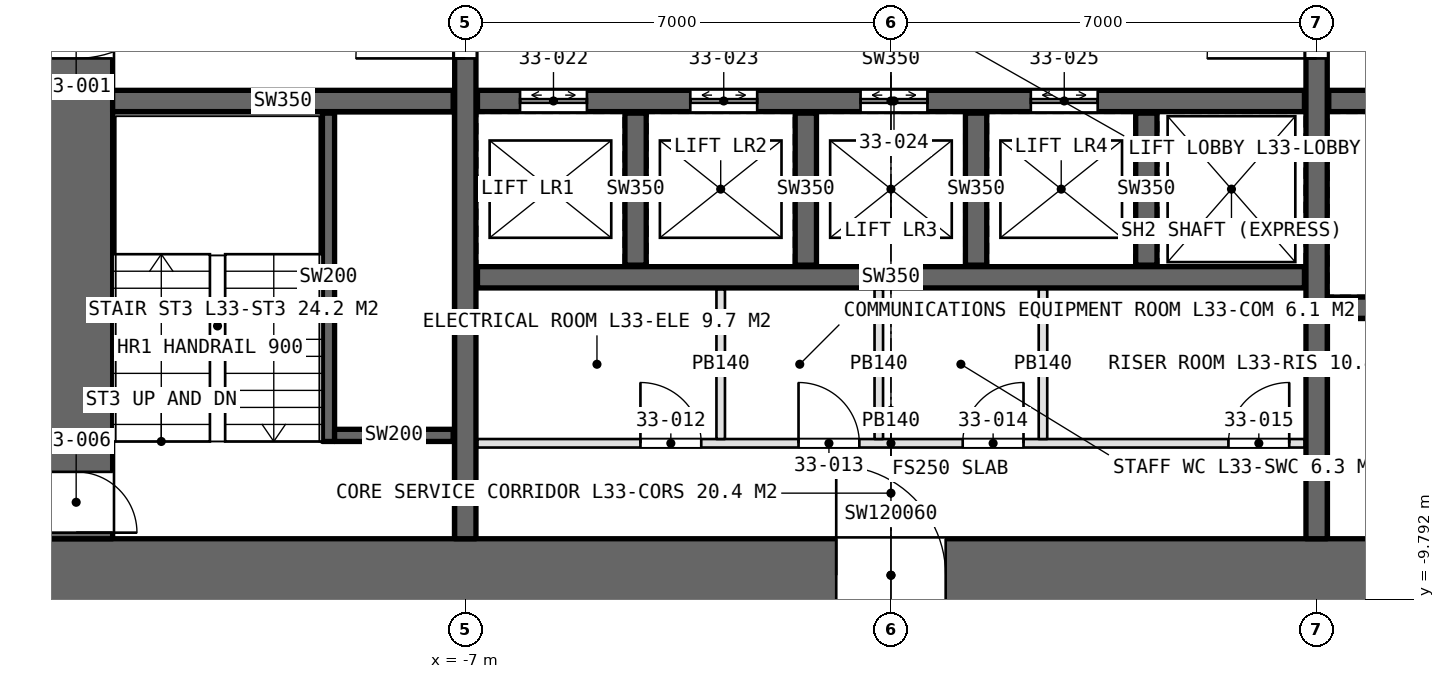
"""IFC4 building model, lengths in metres.
Left out: names, types, materials, properties, quantities, classifications, styles, units other than length and angle.
Written with IfcOpenShell. Run it as: python <this file> out.ifc"""

import sys

from ifc_helpers import new_model, si_unit, direction, frame, frame_2d, origin, place, context, subcontext, project, spatial, rectangle, extrude, element, fill, save


model = new_model("IFC4")
c1 = context("Model", 3, precision=1e-05, world=origin(), true_north=direction((0.0, 1.0)))
c2 = subcontext(c1, "Body", "Model", "MODEL_VIEW")
j1 = project(units=[si_unit("LENGTHUNIT", "METRE"), si_unit("PLANEANGLEUNIT", "RADIAN")], contexts=[c1])
p1 = place(None, origin())
s1 = spatial("IfcSite", under=j1, at=p1, CompositionType="ELEMENT")
p2 = place(p1, origin())
s2 = spatial("IfcBuilding", under=s1, at=p2, CompositionType="ELEMENT")
p3 = place(p2, frame((0.0, 0.0, 155.4)))
s3 = spatial("IfcBuildingStorey", under=s2, at=p3, CompositionType="ELEMENT", Elevation=155.4)
p4 = place(p3, frame((-14.0, -9.4, 0.0), z_axis=(0.0, 0.0, 1.0), x_axis=(1.0, 0.0, 0.0)))
e1 = element("IfcWall", 1, at=p4, inside=s3, PredefinedType="SHEAR", context=c2, shape_type="SweptSolid", body=[
    extrude(rectangle(XDim=28.0, YDim=1.2, at=frame_2d((14.0, 0.0))), origin(), (0.0, 0.0, 1.0), 4.2),
])
p5 = place(p4, frame((13.1, 0.0, 0.0)))
e2 = element("IfcOpeningElement", 2, at=p5, cuts=e1, PredefinedType="OPENING", context=c2, shape_type="SweptSolid", body=[
    extrude(rectangle(XDim=1.8, YDim=2.4, at=frame_2d((0.9, 1.2))), frame((0.0, 0.61, 0.0), z_axis=(0.0, -1.0, 0.0), x_axis=(1.0, 0.0, 0.0)), (0.0, 0.0, 1.0), 1.22),
])
p6 = place(p4, frame((22.9, 0.0, 0.0)))
e3 = element("IfcOpeningElement", 3, at=p6, cuts=e1, PredefinedType="OPENING", context=c2, shape_type="SweptSolid", body=[
    extrude(rectangle(XDim=2.2, YDim=2.7, at=frame_2d((1.1, 1.35))), frame((0.0, 0.61, 0.0), z_axis=(0.0, -1.0, 0.0), x_axis=(1.0, 0.0, 0.0)), (0.0, 0.0, 1.0), 1.22),
])
p7 = place(p3, frame((-13.4, 8.8, 0.0), z_axis=(0.0, 0.0, 1.0), x_axis=(0.0, -1.0, 0.0)))
e4 = element("IfcWall", 4, at=p7, inside=s3, PredefinedType="SHEAR", context=c2, shape_type="SweptSolid", body=[
    extrude(rectangle(XDim=17.6, YDim=1.2, at=frame_2d((8.8, 0.0))), origin(), (0.0, 0.0, 1.0), 4.2),
])
p8 = place(p7, frame((7.9, 0.0, 0.0)))
e5 = element("IfcOpeningElement", 5, at=p8, cuts=e4, PredefinedType="OPENING", context=c2, shape_type="SweptSolid", body=[
    extrude(rectangle(XDim=1.8, YDim=2.4, at=frame_2d((0.9, 1.2))), frame((0.0, 0.61, 0.0), z_axis=(0.0, -1.0, 0.0), x_axis=(1.0, 0.0, 0.0)), (0.0, 0.0, 1.0), 1.22),
])
p9 = place(p7, frame((16.5, 0.0, 0.0)))
e6 = element("IfcOpeningElement", 6, at=p9, cuts=e4, PredefinedType="OPENING", context=c2, shape_type="SweptSolid", body=[
    extrude(rectangle(XDim=1.0, YDim=2.4, at=frame_2d((0.5, 1.2))), frame((0.0, 0.61, 0.0), z_axis=(0.0, -1.0, 0.0), x_axis=(1.0, 0.0, 0.0)), (0.0, 0.0, 1.0), 1.22),
])
p10 = place(p3, frame((-7.0, -8.8, 0.0), z_axis=(0.0, 0.0, 1.0), x_axis=(0.0, 1.0, 0.0)))
e7 = element("IfcWall", 7, at=p10, inside=s3, PredefinedType="SHEAR", context=c2, shape_type="SweptSolid", body=[
    extrude(rectangle(XDim=17.6, YDim=0.35, at=frame_2d((8.8, 0.0))), origin(), (0.0, 0.0, 1.0), 4.2),
])
p11 = place(p10, frame((7.9, 0.0, 0.0)))
e8 = element("IfcOpeningElement", 8, at=p11, cuts=e7, PredefinedType="OPENING", context=c2, shape_type="SweptSolid", body=[
    extrude(rectangle(XDim=1.8, YDim=2.4, at=frame_2d((0.9, 1.2))), frame((0.0, 0.185, 0.0), z_axis=(0.0, -1.0, 0.0), x_axis=(1.0, 0.0, 0.0)), (0.0, 0.0, 1.0), 0.37),
])
p12 = place(p3, frame((7.0, -8.8, 0.0), z_axis=(0.0, 0.0, 1.0), x_axis=(0.0, 1.0, 0.0)))
e9 = element("IfcWall", 9, at=p12, inside=s3, PredefinedType="SHEAR", context=c2, shape_type="SweptSolid", body=[
    extrude(rectangle(XDim=17.6, YDim=0.35, at=frame_2d((8.8, 0.0))), origin(), (0.0, 0.0, 1.0), 4.2),
])
p13 = place(p12, frame((7.9, 0.0, 0.0)))
e10 = element("IfcOpeningElement", 10, at=p13, cuts=e9, PredefinedType="OPENING", context=c2, shape_type="SweptSolid", body=[
    extrude(rectangle(XDim=1.8, YDim=2.4, at=frame_2d((0.9, 1.2))), frame((0.0, 0.185, 0.0), z_axis=(0.0, -1.0, 0.0), x_axis=(1.0, 0.0, 0.0)), (0.0, 0.0, 1.0), 0.37),
])
p14 = place(p3, frame((-6.8, -1.6, 0.0), z_axis=(0.0, 0.0, 1.0), x_axis=(1.0, 0.0, 0.0)))
e11 = element("IfcWall", 11, at=p14, inside=s3, PredefinedType="SHEAR", context=c2, shape_type="SweptSolid", body=[
    extrude(rectangle(XDim=13.6, YDim=0.35, at=frame_2d((6.8, 0.0))), origin(), (0.0, 0.0, 1.0), 4.2),
])
p15 = place(p14, frame((0.7, 0.0, 0.0)))
e12 = element("IfcOpeningElement", 12, at=p15, cuts=e11, PredefinedType="OPENING", context=c2, shape_type="SweptSolid", body=[
    extrude(rectangle(XDim=1.1, YDim=2.4, at=frame_2d((0.55, 1.2))), frame((0.0, 0.185, 0.0), z_axis=(0.0, -1.0, 0.0), x_axis=(1.0, 0.0, 0.0)), (0.0, 0.0, 1.0), 0.37),
])
p16 = place(p14, frame((3.5, 0.0, 0.0)))
e13 = element("IfcOpeningElement", 13, at=p16, cuts=e11, PredefinedType="OPENING", context=c2, shape_type="SweptSolid", body=[
    extrude(rectangle(XDim=1.1, YDim=2.4, at=frame_2d((0.55, 1.2))), frame((0.0, 0.185, 0.0), z_axis=(0.0, -1.0, 0.0), x_axis=(1.0, 0.0, 0.0)), (0.0, 0.0, 1.0), 0.37),
])
p17 = place(p14, frame((6.3, 0.0, 0.0)))
e14 = element("IfcOpeningElement", 14, at=p17, cuts=e11, PredefinedType="OPENING", context=c2, shape_type="SweptSolid", body=[
    extrude(rectangle(XDim=1.1, YDim=2.4, at=frame_2d((0.55, 1.2))), frame((0.0, 0.185, 0.0), z_axis=(0.0, -1.0, 0.0), x_axis=(1.0, 0.0, 0.0)), (0.0, 0.0, 1.0), 0.37),
])
p18 = place(p14, frame((9.1, 0.0, 0.0)))
e15 = element("IfcOpeningElement", 15, at=p18, cuts=e11, PredefinedType="OPENING", context=c2, shape_type="SweptSolid", body=[
    extrude(rectangle(XDim=1.1, YDim=2.4, at=frame_2d((0.55, 1.2))), frame((0.0, 0.185, 0.0), z_axis=(0.0, -1.0, 0.0), x_axis=(1.0, 0.0, 0.0)), (0.0, 0.0, 1.0), 0.37),
])
p19 = place(p3, frame((-6.8, -4.5, 0.0), z_axis=(0.0, 0.0, 1.0), x_axis=(1.0, 0.0, 0.0)))
e16 = element("IfcWall", 16, at=p19, inside=s3, PredefinedType="SHEAR", context=c2, shape_type="SweptSolid", body=[
    extrude(rectangle(XDim=13.6, YDim=0.35, at=frame_2d((6.8, 0.0))), origin(), (0.0, 0.0, 1.0), 4.2),
])
p20 = place(p3, frame((-12.8, -1.6, 0.0), z_axis=(0.0, 0.0, 1.0), x_axis=(1.0, 0.0, 0.0)))
e17 = element("IfcWall", 17, at=p20, inside=s3, PredefinedType="SHEAR", context=c2, shape_type="SweptSolid", body=[
    extrude(rectangle(XDim=5.6, YDim=0.35, at=frame_2d((2.8, 0.0))), origin(), (0.0, 0.0, 1.0), 4.2),
])
p21 = place(p3, frame((7.2, -1.6, 0.0), z_axis=(0.0, 0.0, 1.0), x_axis=(1.0, 0.0, 0.0)))
e18 = element("IfcWall", 18, at=p21, inside=s3, PredefinedType="SHEAR", context=c2, shape_type="SweptSolid", body=[
    extrude(rectangle(XDim=5.6, YDim=0.35, at=frame_2d((2.8, 0.0))), origin(), (0.0, 0.0, 1.0), 4.2),
])
p22 = place(p21, frame((0.9, 0.0, 0.0)))
e19 = element("IfcOpeningElement", 19, at=p22, cuts=e18, PredefinedType="OPENING", context=c2, shape_type="SweptSolid", body=[
    extrude(rectangle(XDim=1.3, YDim=2.4, at=frame_2d((0.65, 1.2))), frame((0.0, 0.185, 0.0), z_axis=(0.0, -1.0, 0.0), x_axis=(1.0, 0.0, 0.0)), (0.0, 0.0, 1.0), 0.37),
])
p23 = place(p21, frame((3.9, 0.0, 0.0)))
e20 = element("IfcOpeningElement", 20, at=p23, cuts=e18, PredefinedType="OPENING", context=c2, shape_type="SweptSolid", body=[
    extrude(rectangle(XDim=1.3, YDim=2.4, at=frame_2d((0.65, 1.2))), frame((0.0, 0.185, 0.0), z_axis=(0.0, -1.0, 0.0), x_axis=(1.0, 0.0, 0.0)), (0.0, 0.0, 1.0), 0.37),
])
p24 = place(p3, frame((7.2, -5.0, 0.0), z_axis=(0.0, 0.0, 1.0), x_axis=(1.0, 0.0, 0.0)))
e21 = element("IfcWall", 21, at=p24, inside=s3, PredefinedType="SHEAR", context=c2, shape_type="SweptSolid", body=[
    extrude(rectangle(XDim=5.6, YDim=0.35, at=frame_2d((2.8, 0.0))), origin(), (0.0, 0.0, 1.0), 4.2),
])
for number, where, z_axis, x_axis in (
    (22, (-4.2, -4.3, 0.0), (0.0, 0.0, 1.0), (0.0, 1.0, 0.0)),
    (23, (-1.4, -4.3, 0.0), (0.0, 0.0, 1.0), (0.0, 1.0, 0.0)),
    (24, (1.4, -4.3, 0.0), (0.0, 0.0, 1.0), (0.0, 1.0, 0.0)),
    (25, (4.2, -4.3, 0.0), (0.0, 0.0, 1.0), (0.0, 1.0, 0.0)),
):
    element("IfcWall", number, at=place(p3, frame(where, z_axis=z_axis, x_axis=x_axis)), inside=s3, PredefinedType="SHEAR", context=c2, shape_type="SweptSolid", body=[
        extrude(rectangle(XDim=2.5, YDim=0.35, at=frame_2d((1.25, 0.0))), origin(), (0.0, 0.0, 1.0), 4.2),
    ])
p25 = place(p3, frame((-6.8, -7.23, 0.0), z_axis=(0.0, 0.0, 1.0), x_axis=(1.0, 0.0, 0.0)))
e26 = element("IfcWall", 26, at=p25, inside=s3, PredefinedType="PARTITIONING", context=c2, shape_type="SweptSolid", body=[
    extrude(rectangle(XDim=13.6, YDim=0.14, at=frame_2d((6.8, 0.0))), origin(), (0.0, 0.0, 1.0), 3.95),
])
p26 = place(p25, frame((2.68, 0.0, 0.0)))
e27 = element("IfcOpeningElement", 27, at=p26, cuts=e26, PredefinedType="OPENING", context=c2, shape_type="SweptSolid", body=[
    extrude(rectangle(XDim=1.0, YDim=2.4, at=frame_2d((0.5, 1.2))), frame((0.0, 0.08, 0.0), z_axis=(0.0, -1.0, 0.0), x_axis=(1.0, 0.0, 0.0)), (0.0, 0.0, 1.0), 0.16),
])
p27 = place(p25, frame((5.28, 0.0, 0.0)))
e28 = element("IfcOpeningElement", 28, at=p27, cuts=e26, PredefinedType="OPENING", context=c2, shape_type="SweptSolid", body=[
    extrude(rectangle(XDim=1.0, YDim=2.4, at=frame_2d((0.5, 1.2))), frame((0.0, 0.08, 0.0), z_axis=(0.0, -1.0, 0.0), x_axis=(1.0, 0.0, 0.0)), (0.0, 0.0, 1.0), 0.16),
])
p28 = place(p25, frame((7.98, 0.0, 0.0)))
e29 = element("IfcOpeningElement", 29, at=p28, cuts=e26, PredefinedType="OPENING", context=c2, shape_type="SweptSolid", body=[
    extrude(rectangle(XDim=1.0, YDim=2.4, at=frame_2d((0.5, 1.2))), frame((0.0, 0.08, 0.0), z_axis=(0.0, -1.0, 0.0), x_axis=(1.0, 0.0, 0.0)), (0.0, 0.0, 1.0), 0.16),
])
p29 = place(p25, frame((12.35, 0.0, 0.0)))
e30 = element("IfcOpeningElement", 30, at=p29, cuts=e26, PredefinedType="OPENING", context=c2, shape_type="SweptSolid", body=[
    extrude(rectangle(XDim=1.0, YDim=2.4, at=frame_2d((0.5, 1.2))), frame((0.0, 0.08, 0.0), z_axis=(0.0, -1.0, 0.0), x_axis=(1.0, 0.0, 0.0)), (0.0, 0.0, 1.0), 0.16),
])
for number, where, z_axis, x_axis in (
    (31, (-2.8, -4.7, 0.0), (0.0, 0.0, 1.0), (0.0, -1.0, 0.0)),
    (32, (-0.2, -4.7, 0.0), (0.0, 0.0, 1.0), (0.0, -1.0, 0.0)),
    (33, (2.5, -4.7, 0.0), (0.0, 0.0, 1.0), (0.0, -1.0, 0.0)),
):
    element("IfcWall", number, at=place(p3, frame(where, z_axis=z_axis, x_axis=x_axis)), inside=s3, PredefinedType="PARTITIONING", context=c2, shape_type="SweptSolid", body=[
        extrude(rectangle(XDim=2.46, YDim=0.14, at=frame_2d((1.23, 0.0))), origin(), (0.0, 0.0, 1.0), 3.95),
    ])
p30 = place(p3, frame((-9.25, -7.2, 0.0), z_axis=(0.0, 0.0, 1.0), x_axis=(0.0, 1.0, 0.0)))
e34 = element("IfcWall", 34, at=p30, inside=s3, PredefinedType="SOLIDWALL", context=c2, shape_type="SweptSolid", body=[
    extrude(rectangle(XDim=5.4, YDim=0.2, at=frame_2d((2.7, 0.0))), origin(), (0.0, 0.0, 1.0), 4.2),
])
p31 = place(p3, frame((-9.15, -7.1, 0.0), z_axis=(0.0, 0.0, 1.0), x_axis=(1.0, 0.0, 0.0)))
e35 = element("IfcWall", 35, at=p31, inside=s3, PredefinedType="SOLIDWALL", context=c2, shape_type="SweptSolid", body=[
    extrude(rectangle(XDim=1.95, YDim=0.2, at=frame_2d((0.975, 0.0))), origin(), (0.0, 0.0, 1.0), 4.2),
])
p32 = place(p8, origin())
e36 = element("IfcDoor", 36, at=p32, inside=s3, OperationType="DOUBLE_DOOR_SINGLE_SWING", PredefinedType="DOOR", context=c2, shape_type="SweptSolid", body=[
    extrude(rectangle(XDim=1.8, YDim=2.4, at=frame_2d((0.9, 1.2))), frame((0.0, 0.025, 0.0), z_axis=(0.0, -1.0, 0.0), x_axis=(1.0, 0.0, 0.0)), (0.0, 0.0, 1.0), 0.05),
])
fill(e5, e36)
p33 = place(p11, origin())
e37 = element("IfcDoor", 37, at=p33, inside=s3, OperationType="DOUBLE_DOOR_SINGLE_SWING", PredefinedType="DOOR", context=c2, shape_type="SweptSolid", body=[
    extrude(rectangle(XDim=1.8, YDim=2.4, at=frame_2d((0.9, 1.2))), frame((0.0, 0.025, 0.0), z_axis=(0.0, -1.0, 0.0), x_axis=(1.0, 0.0, 0.0)), (0.0, 0.0, 1.0), 0.05),
])
fill(e8, e37)
p34 = place(p13, origin())
e38 = element("IfcDoor", 38, at=p34, inside=s3, OperationType="DOUBLE_DOOR_SINGLE_SWING", PredefinedType="DOOR", context=c2, shape_type="SweptSolid", body=[
    extrude(rectangle(XDim=1.8, YDim=2.4, at=frame_2d((0.9, 1.2))), frame((0.0, 0.025, 0.0), z_axis=(0.0, -1.0, 0.0), x_axis=(1.0, 0.0, 0.0)), (0.0, 0.0, 1.0), 0.05),
])
fill(e10, e38)
p35 = place(p9, origin())
e39 = element("IfcDoor", 39, at=p35, inside=s3, OperationType="SINGLE_SWING_RIGHT", PredefinedType="DOOR", context=c2, shape_type="SweptSolid", body=[
    extrude(rectangle(XDim=1.0, YDim=2.4, at=frame_2d((0.5, 1.2))), frame((0.0, 0.025, 0.0), z_axis=(0.0, -1.0, 0.0), x_axis=(1.0, 0.0, 0.0)), (0.0, 0.0, 1.0), 0.05),
])
fill(e6, e39)
p36 = place(p26, origin())
e40 = element("IfcDoor", 40, at=p36, inside=s3, OperationType="SINGLE_SWING_LEFT", PredefinedType="DOOR", context=c2, shape_type="SweptSolid", body=[
    extrude(rectangle(XDim=1.0, YDim=2.4, at=frame_2d((0.5, 1.2))), frame((0.0, 0.025, 0.0), z_axis=(0.0, -1.0, 0.0), x_axis=(1.0, 0.0, 0.0)), (0.0, 0.0, 1.0), 0.05),
])
fill(e27, e40)
p37 = place(p27, origin())
e41 = element("IfcDoor", 41, at=p37, inside=s3, OperationType="SINGLE_SWING_LEFT", PredefinedType="DOOR", context=c2, shape_type="SweptSolid", body=[
    extrude(rectangle(XDim=1.0, YDim=2.4, at=frame_2d((0.5, 1.2))), frame((0.0, 0.025, 0.0), z_axis=(0.0, -1.0, 0.0), x_axis=(1.0, 0.0, 0.0)), (0.0, 0.0, 1.0), 0.05),
])
fill(e28, e41)
p38 = place(p28, origin())
e42 = element("IfcDoor", 42, at=p38, inside=s3, OperationType="SINGLE_SWING_RIGHT", PredefinedType="DOOR", context=c2, shape_type="SweptSolid", body=[
    extrude(rectangle(XDim=1.0, YDim=2.4, at=frame_2d((0.5, 1.2))), frame((0.0, 0.025, 0.0), z_axis=(0.0, -1.0, 0.0), x_axis=(1.0, 0.0, 0.0)), (0.0, 0.0, 1.0), 0.05),
])
fill(e29, e42)
p39 = place(p29, origin())
e43 = element("IfcDoor", 43, at=p39, inside=s3, OperationType="SINGLE_SWING_RIGHT", PredefinedType="DOOR", context=c2, shape_type="SweptSolid", body=[
    extrude(rectangle(XDim=1.0, YDim=2.4, at=frame_2d((0.5, 1.2))), frame((0.0, 0.025, 0.0), z_axis=(0.0, -1.0, 0.0), x_axis=(1.0, 0.0, 0.0)), (0.0, 0.0, 1.0), 0.05),
])
fill(e30, e43)
p40 = place(p5, origin())
e44 = element("IfcDoor", 44, at=p40, inside=s3, OperationType="DOUBLE_DOOR_SINGLE_SWING", PredefinedType="DOOR", context=c2, shape_type="SweptSolid", body=[
    extrude(rectangle(XDim=1.8, YDim=2.4, at=frame_2d((0.9, 1.2))), frame((0.0, 0.025, 0.0), z_axis=(0.0, -1.0, 0.0), x_axis=(1.0, 0.0, 0.0)), (0.0, 0.0, 1.0), 0.05),
])
fill(e2, e44)
p41 = place(p15, origin())
e45 = element("IfcDoor", 45, at=p41, inside=s3, OperationType="DOUBLE_DOOR_SLIDING", PredefinedType="DOOR", context=c2, shape_type="SweptSolid", body=[
    extrude(rectangle(XDim=1.1, YDim=2.4, at=frame_2d((0.55, 1.2))), frame((0.0, 0.025, 0.0), z_axis=(0.0, -1.0, 0.0), x_axis=(1.0, 0.0, 0.0)), (0.0, 0.0, 1.0), 0.05),
])
fill(e12, e45)
p42 = place(p16, origin())
e46 = element("IfcDoor", 46, at=p42, inside=s3, OperationType="DOUBLE_DOOR_SLIDING", PredefinedType="DOOR", context=c2, shape_type="SweptSolid", body=[
    extrude(rectangle(XDim=1.1, YDim=2.4, at=frame_2d((0.55, 1.2))), frame((0.0, 0.025, 0.0), z_axis=(0.0, -1.0, 0.0), x_axis=(1.0, 0.0, 0.0)), (0.0, 0.0, 1.0), 0.05),
])
fill(e13, e46)
p43 = place(p17, origin())
e47 = element("IfcDoor", 47, at=p43, inside=s3, OperationType="DOUBLE_DOOR_SLIDING", PredefinedType="DOOR", context=c2, shape_type="SweptSolid", body=[
    extrude(rectangle(XDim=1.1, YDim=2.4, at=frame_2d((0.55, 1.2))), frame((0.0, 0.025, 0.0), z_axis=(0.0, -1.0, 0.0), x_axis=(1.0, 0.0, 0.0)), (0.0, 0.0, 1.0), 0.05),
])
fill(e14, e47)
p44 = place(p18, origin())
e48 = element("IfcDoor", 48, at=p44, inside=s3, OperationType="DOUBLE_DOOR_SLIDING", PredefinedType="DOOR", context=c2, shape_type="SweptSolid", body=[
    extrude(rectangle(XDim=1.1, YDim=2.4, at=frame_2d((0.55, 1.2))), frame((0.0, 0.025, 0.0), z_axis=(0.0, -1.0, 0.0), x_axis=(1.0, 0.0, 0.0)), (0.0, 0.0, 1.0), 0.05),
])
fill(e15, e48)
save(model, sys.argv[1])
